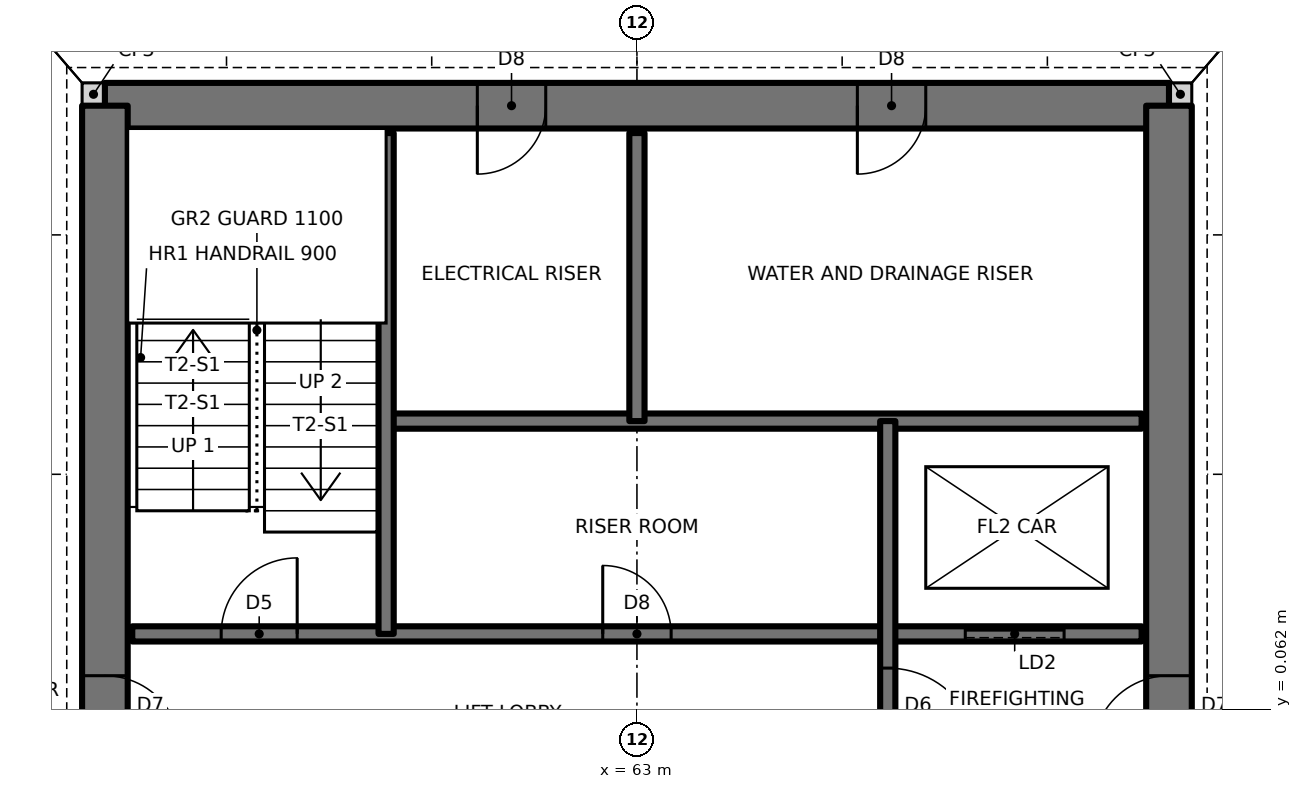
"""IFC4 building model, lengths in metres.
Left out: names, types, materials, properties, quantities, classifications, styles, units other than length and angle.
Written with IfcOpenShell. Run it as: python <this file> out.ifc"""

import sys

from ifc_helpers import new_model, si_unit, direction, frame, frame_2d, origin, place, context, subcontext, project, spatial, rectangle, extrude, element, fill, save


model = new_model("IFC4")
c1 = context("Model", 3, precision=1e-05, world=origin(), true_north=direction((0.0, 1.0)))
c2 = subcontext(c1, "Body", "Model", "MODEL_VIEW")
j1 = project(units=[si_unit("LENGTHUNIT", "METRE"), si_unit("PLANEANGLEUNIT", "RADIAN")], contexts=[c1])
p1 = place(None, origin())
s1 = spatial("IfcSite", under=j1, at=p1, CompositionType="ELEMENT")
p2 = place(p1, origin())
s2 = spatial("IfcBuilding", under=s1, at=p2, CompositionType="ELEMENT")
p3 = place(p2, frame((0.0, 0.0, 18.5)))
s3 = spatial("IfcBuildingStorey", under=s2, at=p3, CompositionType="ELEMENT", Elevation=18.5)
for number, where, z_axis, x_axis in (
    (1, (70.0, 8.15, 0.0), (0.0, 0.0, 1.0), (1.0, 0.0, 0.0)),
    (2, (55.7, 8.15, 0.0), (0.0, 0.0, 1.0), (1.0, 0.0, 0.0)),
):
    element("IfcWall", number, at=place(p3, frame(where, z_axis=z_axis, x_axis=x_axis)), inside=s3, PredefinedType="SOLIDWALL", context=c2, shape_type="SweptSolid", body=[
        extrude(rectangle(XDim=0.3, YDim=0.3, at=frame_2d((0.15, 0.0))), origin(), (0.0, 0.0, 1.0), 3.5),
    ])
p4 = place(p3, frame((70.0, 8.0, 0.0), z_axis=(0.0, 0.0, 1.0), x_axis=(-1.0, 0.0, 0.0)))
e3 = element("IfcWall", 3, at=p4, inside=s3, PredefinedType="SHEAR", context=c2, shape_type="SweptSolid", body=[
    extrude(rectangle(XDim=14.0, YDim=0.6, at=frame_2d((7.0, 0.0))), origin(), (0.0, 0.0, 1.0), 3.5),
])
p5 = place(p4, frame((8.2, 0.0, 0.0)))
e4 = element("IfcOpeningElement", 4, at=p5, cuts=e3, PredefinedType="OPENING", context=c2, shape_type="SweptSolid", body=[
    extrude(rectangle(XDim=0.9, YDim=2.1, at=frame_2d((0.45, 1.05))), frame((0.0, 0.31, 0.0), z_axis=(0.0, -1.0, 0.0), x_axis=(1.0, 0.0, 0.0)), (0.0, 0.0, 1.0), 0.62),
])
p6 = place(p4, frame((3.2, 0.0, 0.0)))
e5 = element("IfcOpeningElement", 5, at=p6, cuts=e3, PredefinedType="OPENING", context=c2, shape_type="SweptSolid", body=[
    extrude(rectangle(XDim=0.9, YDim=2.1, at=frame_2d((0.45, 1.05))), frame((0.0, 0.31, 0.0), z_axis=(0.0, -1.0, 0.0), x_axis=(1.0, 0.0, 0.0)), (0.0, 0.0, 1.0), 0.62),
])
p7 = place(p3, frame((70.0, -8.0, 0.0), z_axis=(0.0, 0.0, 1.0), x_axis=(0.0, 1.0, 0.0)))
e6 = element("IfcWall", 6, at=p7, inside=s3, PredefinedType="SHEAR", context=c2, shape_type="SweptSolid", body=[
    extrude(rectangle(XDim=16.0, YDim=0.6, at=frame_2d((8.0, 0.0))), origin(), (0.0, 0.0, 1.0), 3.5),
])
p8 = place(p7, frame((7.5, 0.0, 0.0)))
e7 = element("IfcOpeningElement", 7, at=p8, cuts=e6, PredefinedType="OPENING", context=c2, shape_type="SweptSolid", body=[
    extrude(rectangle(XDim=1.0, YDim=2.1, at=frame_2d((0.5, 1.05))), frame((0.0, 0.31, 0.0), z_axis=(0.0, -1.0, 0.0), x_axis=(1.0, 0.0, 0.0)), (0.0, 0.0, 1.0), 0.62),
])
p9 = place(p3, frame((56.0, 8.0, 0.0), z_axis=(0.0, 0.0, 1.0), x_axis=(0.0, -1.0, 0.0)))
e8 = element("IfcWall", 8, at=p9, inside=s3, PredefinedType="SHEAR", context=c2, shape_type="SweptSolid", body=[
    extrude(rectangle(XDim=16.0, YDim=0.6, at=frame_2d((8.0, 0.0))), origin(), (0.0, 0.0, 1.0), 3.5),
])
p10 = place(p9, frame((7.5, 0.0, 0.0)))
e9 = element("IfcOpeningElement", 9, at=p10, cuts=e8, PredefinedType="OPENING", context=c2, shape_type="SweptSolid", body=[
    extrude(rectangle(XDim=1.0, YDim=2.1, at=frame_2d((0.5, 1.05))), frame((0.0, 0.31, 0.0), z_axis=(0.0, -1.0, 0.0), x_axis=(1.0, 0.0, 0.0)), (0.0, 0.0, 1.0), 0.62),
])
p11 = place(p3, frame((56.36, 1.05, 0.0), z_axis=(0.0, 0.0, 1.0), x_axis=(1.0, 0.0, 0.0)))
e10 = element("IfcWall", 10, at=p11, inside=s3, PredefinedType="SOLIDWALL", context=c2, shape_type="SweptSolid", body=[
    extrude(rectangle(XDim=13.28, YDim=0.2, at=frame_2d((6.64, 0.0))), origin(), (0.0, 0.0, 1.0), 3.5),
])
p12 = place(p11, frame((1.17, 0.0, 0.0)))
e11 = element("IfcOpeningElement", 11, at=p12, cuts=e10, PredefinedType="OPENING", context=c2, shape_type="SweptSolid", body=[
    extrude(rectangle(XDim=1.0, YDim=2.1, at=frame_2d((0.5, 1.05))), frame((0.0, 0.11, 0.0), z_axis=(0.0, -1.0, 0.0), x_axis=(1.0, 0.0, 0.0)), (0.0, 0.0, 1.0), 0.22),
])
p13 = place(p11, frame((6.19, 0.0, 0.0)))
e12 = element("IfcOpeningElement", 12, at=p13, cuts=e10, PredefinedType="OPENING", context=c2, shape_type="SweptSolid", body=[
    extrude(rectangle(XDim=0.9, YDim=2.1, at=frame_2d((0.45, 1.05))), frame((0.0, 0.11, 0.0), z_axis=(0.0, -1.0, 0.0), x_axis=(1.0, 0.0, 0.0)), (0.0, 0.0, 1.0), 0.22),
])
p14 = place(p11, frame((10.96, 0.0, 0.0)))
e13 = element("IfcOpeningElement", 13, at=p14, cuts=e10, PredefinedType="OPENING", context=c2, shape_type="SweptSolid", body=[
    extrude(rectangle(XDim=1.3, YDim=2.1, at=frame_2d((0.65, 1.05))), frame((0.0, 0.11, 0.0), z_axis=(0.0, -1.0, 0.0), x_axis=(1.0, 0.0, 0.0)), (0.0, 0.0, 1.0), 0.22),
])
p15 = place(p3, frame((59.7, 3.85, 0.0), z_axis=(0.0, 0.0, 1.0), x_axis=(1.0, 0.0, 0.0)))
e14 = element("IfcWall", 14, at=p15, inside=s3, PredefinedType="SOLIDWALL", context=c2, shape_type="SweptSolid", body=[
    extrude(rectangle(XDim=9.94, YDim=0.2, at=frame_2d((4.97, 0.0))), origin(), (0.0, 0.0, 1.0), 3.5),
])
p16 = place(p3, frame((66.3, -7.64, 0.0), z_axis=(0.0, 0.0, 1.0), x_axis=(0.0, 1.0, 0.0)))
e15 = element("IfcWall", 15, at=p16, inside=s3, PredefinedType="SOLIDWALL", context=c2, shape_type="SweptSolid", body=[
    extrude(rectangle(XDim=11.49, YDim=0.2, at=frame_2d((5.745, 0.0))), origin(), (0.0, 0.0, 1.0), 3.5),
])
p17 = place(p16, frame((7.04, 0.0, 0.0)))
e16 = element("IfcOpeningElement", 16, at=p17, cuts=e15, PredefinedType="OPENING", context=c2, shape_type="SweptSolid", body=[
    extrude(rectangle(XDim=1.2, YDim=2.1, at=frame_2d((0.6, 1.05))), frame((0.0, 0.11, 0.0), z_axis=(0.0, -1.0, 0.0), x_axis=(1.0, 0.0, 0.0)), (0.0, 0.0, 1.0), 0.22),
])
p18 = place(p3, frame((63.0, 3.85, 0.0), z_axis=(0.0, 0.0, 1.0), x_axis=(0.0, 1.0, 0.0)))
e17 = element("IfcWall", 17, at=p18, inside=s3, PredefinedType="SOLIDWALL", context=c2, shape_type="SweptSolid", body=[
    extrude(rectangle(XDim=3.79, YDim=0.2, at=frame_2d((1.895, 0.0))), origin(), (0.0, 0.0, 1.0), 3.5),
])
p19 = place(p3, frame((59.7, 1.05, 0.0), z_axis=(0.0, 0.0, 1.0), x_axis=(0.0, 1.0, 0.0)))
e18 = element("IfcWall", 18, at=p19, inside=s3, PredefinedType="SOLIDWALL", context=c2, shape_type="SweptSolid", body=[
    extrude(rectangle(XDim=6.59, YDim=0.2, at=frame_2d((3.295, 0.0))), origin(), (0.0, 0.0, 1.0), 3.5),
])
p20 = place(p12, origin())
e19 = element("IfcDoor", 19, at=p20, inside=s3, OperationType="SINGLE_SWING_RIGHT", PredefinedType="DOOR", context=c2, shape_type="SweptSolid", body=[
    extrude(rectangle(XDim=1.0, YDim=2.1, at=frame_2d((0.5, 1.05))), frame((0.0, 0.025, 0.0), z_axis=(0.0, -1.0, 0.0), x_axis=(1.0, 0.0, 0.0)), (0.0, 0.0, 1.0), 0.05),
])
fill(e11, e19)
p21 = place(p17, frame((1.2, 0.0, 0.0), z_axis=(0.0, 0.0, 1.0), x_axis=(-1.0, 0.0, 0.0)))
e20 = element("IfcDoor", 20, at=p21, inside=s3, OperationType="SINGLE_SWING_RIGHT", PredefinedType="DOOR", context=c2, shape_type="SweptSolid", body=[
    extrude(rectangle(XDim=1.2, YDim=2.1, at=frame_2d((0.6, 1.05))), frame((0.0, 0.025, 0.0), z_axis=(0.0, -1.0, 0.0), x_axis=(1.0, 0.0, 0.0)), (0.0, 0.0, 1.0), 0.05),
])
fill(e16, e20)
p22 = place(p13, origin())
e21 = element("IfcDoor", 21, at=p22, inside=s3, OperationType="SINGLE_SWING_LEFT", PredefinedType="DOOR", context=c2, shape_type="SweptSolid", body=[
    extrude(rectangle(XDim=0.9, YDim=2.1, at=frame_2d((0.45, 1.05))), frame((0.0, 0.025, 0.0), z_axis=(0.0, -1.0, 0.0), x_axis=(1.0, 0.0, 0.0)), (0.0, 0.0, 1.0), 0.05),
])
fill(e12, e21)
p23 = place(p10, origin())
e22 = element("IfcDoor", 22, at=p23, inside=s3, OperationType="SINGLE_SWING_RIGHT", PredefinedType="DOOR", context=c2, shape_type="SweptSolid", body=[
    extrude(rectangle(XDim=1.0, YDim=2.1, at=frame_2d((0.5, 1.05))), frame((0.0, 0.025, 0.0), z_axis=(0.0, -1.0, 0.0), x_axis=(1.0, 0.0, 0.0)), (0.0, 0.0, 1.0), 0.05),
])
fill(e9, e22)
p24 = place(p8, origin())
e23 = element("IfcDoor", 23, at=p24, inside=s3, OperationType="SINGLE_SWING_LEFT", PredefinedType="DOOR", context=c2, shape_type="SweptSolid", body=[
    extrude(rectangle(XDim=1.0, YDim=2.1, at=frame_2d((0.5, 1.05))), frame((0.0, 0.025, 0.0), z_axis=(0.0, -1.0, 0.0), x_axis=(1.0, 0.0, 0.0)), (0.0, 0.0, 1.0), 0.05),
])
fill(e7, e23)
p25 = place(p5, origin())
e24 = element("IfcDoor", 24, at=p25, inside=s3, OperationType="SINGLE_SWING_RIGHT", PredefinedType="DOOR", context=c2, shape_type="SweptSolid", body=[
    extrude(rectangle(XDim=0.9, YDim=2.1, at=frame_2d((0.45, 1.05))), frame((0.0, 0.025, 0.0), z_axis=(0.0, -1.0, 0.0), x_axis=(1.0, 0.0, 0.0)), (0.0, 0.0, 1.0), 0.05),
])
fill(e4, e24)
p26 = place(p6, origin())
e25 = element("IfcDoor", 25, at=p26, inside=s3, OperationType="SINGLE_SWING_RIGHT", PredefinedType="DOOR", context=c2, shape_type="SweptSolid", body=[
    extrude(rectangle(XDim=0.9, YDim=2.1, at=frame_2d((0.45, 1.05))), frame((0.0, 0.025, 0.0), z_axis=(0.0, -1.0, 0.0), x_axis=(1.0, 0.0, 0.0)), (0.0, 0.0, 1.0), 0.05),
])
fill(e5, e25)
p27 = place(p14, origin())
e26 = element("IfcDoor", 26, at=p27, inside=s3, OperationType="SLIDING_TO_LEFT", PredefinedType="DOOR", context=c2, shape_type="SweptSolid", body=[
    extrude(rectangle(XDim=1.3, YDim=2.1, at=frame_2d((0.65, 1.05))), frame((0.0, 0.025, 0.0), z_axis=(0.0, -1.0, 0.0), x_axis=(1.0, 0.0, 0.0)), (0.0, 0.0, 1.0), 0.05),
])
fill(e13, e26)
save(model, sys.argv[1])
